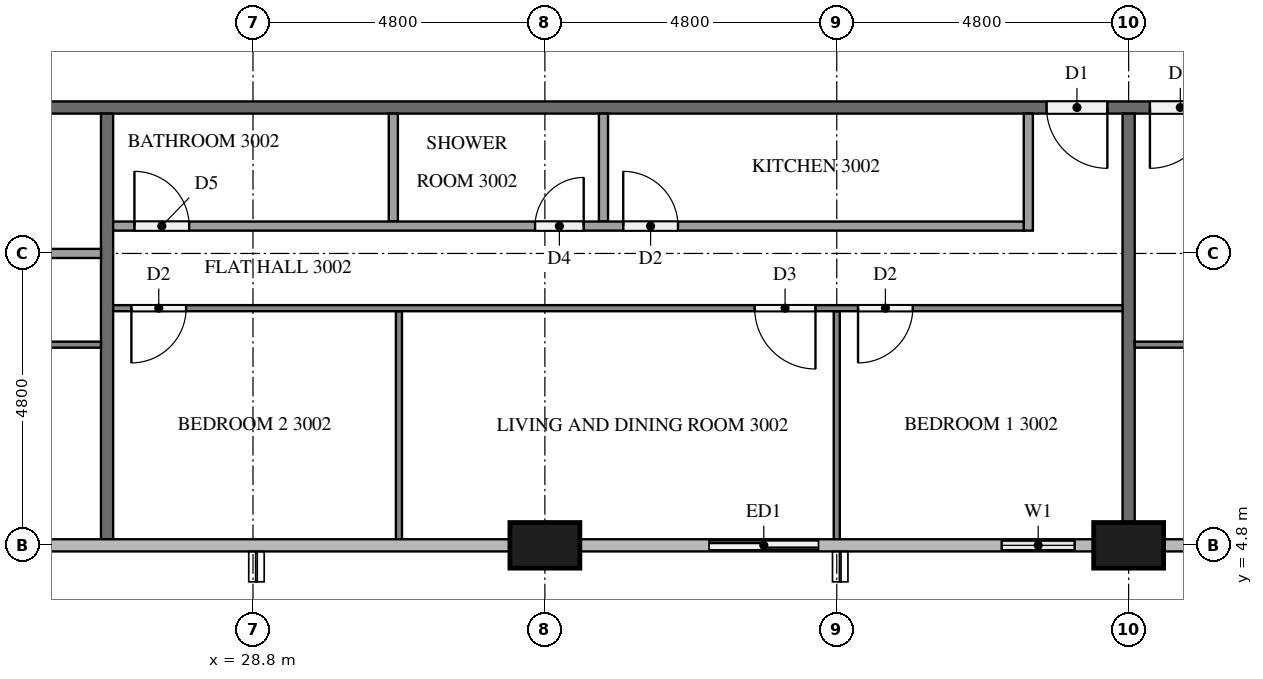
"""IFC4 building model, lengths in metres.
Left out: names, types, materials, properties, quantities, classifications, styles, units other than length and angle.
Written with IfcOpenShell. Run it as: python <this file> out.ifc"""

import sys

from ifc_helpers import new_model, si_unit, direction, frame, frame_2d, origin, origin_2d, place, context, subcontext, project, spatial, rectangle, extrude, element, fill, save


model = new_model("IFC4")
c1 = context("Model", 3, precision=1e-05, world=origin(), true_north=direction((0.0, 1.0)))
c2 = subcontext(c1, "Body", "Model", "MODEL_VIEW")
j1 = project(units=[si_unit("LENGTHUNIT", "METRE"), si_unit("PLANEANGLEUNIT", "RADIAN")], contexts=[c1])
p1 = place(None, origin())
s1 = spatial("IfcSite", under=j1, at=p1, CompositionType="ELEMENT")
p2 = place(p1, origin())
s2 = spatial("IfcBuilding", under=s1, at=p2, CompositionType="ELEMENT")
p3 = place(p2, frame((0.0, 0.0, 119.1)))
s3 = spatial("IfcBuildingStorey", under=s2, at=p3, CompositionType="ELEMENT", Elevation=119.1)
for number, where, z_axis, x_axis in (
    (1, (33.6, 4.8, 0.0), (0.0, 0.0, 1.0), (1.0, 0.0, 0.0)),
    (2, (43.2, 4.8, 0.0), (0.0, 0.0, 1.0), (1.0, 0.0, 0.0)),
):
    element("IfcColumn", number, at=place(p3, frame(where, z_axis=z_axis, x_axis=x_axis)), inside=s3, PredefinedType="COLUMN", context=c2, shape_type="SweptSolid", body=[
        extrude(rectangle(XDim=1.15, YDim=0.75, at=origin_2d()), origin(), (0.0, 0.0, 1.0), 3.2),
    ])
p4 = place(p3, frame((36.0, 4.8, 0.0), z_axis=(0.0, 0.0, 1.0), x_axis=(1.0, 0.0, 0.0)))
e3 = element("IfcWall", 3, at=p4, inside=s3, PredefinedType="SOLIDWALL", context=c2, shape_type="SweptSolid", body=[
    extrude(rectangle(XDim=2.4, YDim=0.15, at=frame_2d((1.2, 0.0))), origin(), (0.0, 0.0, 1.0), 3.2),
])
p5 = place(p4, frame((0.3, 0.0, 0.0)))
e4 = element("IfcOpeningElement", 4, at=p5, cuts=e3, PredefinedType="OPENING", context=c2, shape_type="SweptSolid", body=[
    extrude(rectangle(XDim=1.8, YDim=2.4, at=frame_2d((0.9, 1.2))), frame((0.0, 0.085, 0.0), z_axis=(0.0, -1.0, 0.0), x_axis=(1.0, 0.0, 0.0)), (0.0, 0.0, 1.0), 0.17),
])
p6 = place(p3, frame((40.8, 4.8, 0.0), z_axis=(0.0, 0.0, 1.0), x_axis=(1.0, 0.0, 0.0)))
e5 = element("IfcWall", 5, at=p6, inside=s3, PredefinedType="SOLIDWALL", context=c2, shape_type="SweptSolid", body=[
    extrude(rectangle(XDim=1.825, YDim=0.15, at=frame_2d((0.913, 0.0))), origin(), (0.0, 0.0, 1.0), 3.2),
])
p7 = place(p6, frame((0.312, 0.0, 0.9)))
e6 = element("IfcOpeningElement", 6, at=p7, cuts=e5, PredefinedType="OPENING", context=c2, shape_type="SweptSolid", body=[
    extrude(rectangle(XDim=1.2, YDim=1.4, at=frame_2d((0.6, 0.7))), frame((0.0, 0.085, 0.0), z_axis=(0.0, -1.0, 0.0), x_axis=(1.0, 0.0, 0.0)), (0.0, 0.0, 1.0), 0.17),
])
p8 = place(p3, frame((50.5, 12.0, 0.0), z_axis=(0.0, 0.0, 1.0), x_axis=(-1.0, 0.0, 0.0)))
e7 = element("IfcWall", 7, at=p8, inside=s3, PredefinedType="PARTITIONING", context=c2, shape_type="SweptSolid", body=[
    extrude(rectangle(XDim=38.6, YDim=0.2, at=frame_2d((19.3, 0.0))), origin(), (0.0, 0.0, 1.0), 3.2),
])
p9 = place(p8, frame((37.15, 0.0, 0.0)))
e8 = element("IfcOpeningElement", 8, at=p9, cuts=e7, PredefinedType="OPENING", context=c2, shape_type="SweptSolid", body=[
    extrude(rectangle(XDim=1.0, YDim=2.1, at=frame_2d((0.5, 1.05))), frame((0.0, 0.11, 0.0), z_axis=(0.0, -1.0, 0.0), x_axis=(1.0, 0.0, 0.0)), (0.0, 0.0, 1.0), 0.22),
])
p10 = place(p8, frame((7.65, 0.0, 0.0)))
e9 = element("IfcOpeningElement", 9, at=p10, cuts=e7, PredefinedType="OPENING", context=c2, shape_type="SweptSolid", body=[
    extrude(rectangle(XDim=1.0, YDim=2.1, at=frame_2d((0.5, 1.05))), frame((0.0, 0.11, 0.0), z_axis=(0.0, -1.0, 0.0), x_axis=(1.0, 0.0, 0.0)), (0.0, 0.0, 1.0), 0.22),
])
p11 = place(p8, frame((5.95, 0.0, 0.0)))
e10 = element("IfcOpeningElement", 10, at=p11, cuts=e7, PredefinedType="OPENING", context=c2, shape_type="SweptSolid", body=[
    extrude(rectangle(XDim=1.0, YDim=2.1, at=frame_2d((0.5, 1.05))), frame((0.0, 0.11, 0.0), z_axis=(0.0, -1.0, 0.0), x_axis=(1.0, 0.0, 0.0)), (0.0, 0.0, 1.0), 0.22),
])
p12 = place(p3, frame((26.4, 11.9, 0.0), z_axis=(0.0, 0.0, 1.0), x_axis=(0.0, -1.0, 0.0)))
e11 = element("IfcWall", 11, at=p12, inside=s3, PredefinedType="PARTITIONING", context=c2, shape_type="SweptSolid", body=[
    extrude(rectangle(XDim=7.0, YDim=0.2, at=frame_2d((3.5, 0.0))), origin(), (0.0, 0.0, 1.0), 3.2),
])
p13 = place(p3, frame((43.2, 11.9, 0.0), z_axis=(0.0, 0.0, 1.0), x_axis=(0.0, -1.0, 0.0)))
e12 = element("IfcWall", 12, at=p13, inside=s3, PredefinedType="PARTITIONING", context=c2, shape_type="SweptSolid", body=[
    extrude(rectangle(XDim=6.725, YDim=0.2, at=frame_2d((3.362, 0.0))), origin(), (0.0, 0.0, 1.0), 3.2),
])
p14 = place(p3, frame((26.3, 8.1, 0.0), z_axis=(0.0, 0.0, 1.0), x_axis=(-1.0, 0.0, 0.0)))
e13 = element("IfcWall", 13, at=p14, inside=s3, PredefinedType="PARTITIONING", context=c2, shape_type="SweptSolid", body=[
    extrude(rectangle(XDim=14.2, YDim=0.1, at=frame_2d((7.1, 0.0))), origin(), (0.0, 0.0, 1.0), 3.2),
])
p15 = place(p14, frame((13.0, 0.0, 0.0)))
e14 = element("IfcOpeningElement", 14, at=p15, cuts=e13, PredefinedType="OPENING", context=c2, shape_type="SweptSolid", body=[
    extrude(rectangle(XDim=0.9, YDim=2.1, at=frame_2d((0.45, 1.05))), frame((0.0, 0.06, 0.0), z_axis=(0.0, -1.0, 0.0), x_axis=(1.0, 0.0, 0.0)), (0.0, 0.0, 1.0), 0.12),
])
p16 = place(p14, frame((5.05, 0.0, 0.0)))
e15 = element("IfcOpeningElement", 15, at=p16, cuts=e13, PredefinedType="OPENING", context=c2, shape_type="SweptSolid", body=[
    extrude(rectangle(XDim=0.9, YDim=2.1, at=frame_2d((0.45, 1.05))), frame((0.0, 0.06, 0.0), z_axis=(0.0, -1.0, 0.0), x_axis=(1.0, 0.0, 0.0)), (0.0, 0.0, 1.0), 0.12),
])
p17 = place(p14, frame((3.35, 0.0, 0.0)))
e16 = element("IfcOpeningElement", 16, at=p17, cuts=e13, PredefinedType="OPENING", context=c2, shape_type="SweptSolid", body=[
    extrude(rectangle(XDim=1.0, YDim=2.1, at=frame_2d((0.5, 1.05))), frame((0.0, 0.06, 0.0), z_axis=(0.0, -1.0, 0.0), x_axis=(1.0, 0.0, 0.0)), (0.0, 0.0, 1.0), 0.12),
])
p18 = place(p3, frame((13.725, 9.6, 0.0), z_axis=(0.0, 0.0, 1.0), x_axis=(1.0, 0.0, 0.0)))
e17 = element("IfcWall", 17, at=p18, inside=s3, PredefinedType="PARTITIONING", context=c2, shape_type="SweptSolid", body=[
    extrude(rectangle(XDim=12.575, YDim=0.15, at=frame_2d((6.288, 0.0))), origin(), (0.0, 0.0, 1.0), 3.2),
])
p19 = place(p18, frame((0.3, 0.0, 0.0)))
e18 = element("IfcOpeningElement", 18, at=p19, cuts=e17, PredefinedType="OPENING", context=c2, shape_type="SweptSolid", body=[
    extrude(rectangle(XDim=0.8, YDim=2.1, at=frame_2d((0.4, 1.05))), frame((0.0, 0.085, 0.0), z_axis=(0.0, -1.0, 0.0), x_axis=(1.0, 0.0, 0.0)), (0.0, 0.0, 1.0), 0.17),
])
p20 = place(p18, frame((5.546, 0.0, 0.0)))
e19 = element("IfcOpeningElement", 19, at=p20, cuts=e17, PredefinedType="OPENING", context=c2, shape_type="SweptSolid", body=[
    extrude(rectangle(XDim=0.9, YDim=2.1, at=frame_2d((0.45, 1.05))), frame((0.0, 0.085, 0.0), z_axis=(0.0, -1.0, 0.0), x_axis=(1.0, 0.0, 0.0)), (0.0, 0.0, 1.0), 0.17),
])
p21 = place(p18, frame((7.096, 0.0, 0.0)))
e20 = element("IfcOpeningElement", 20, at=p21, cuts=e17, PredefinedType="OPENING", context=c2, shape_type="SweptSolid", body=[
    extrude(rectangle(XDim=0.9, YDim=2.1, at=frame_2d((0.45, 1.05))), frame((0.0, 0.085, 0.0), z_axis=(0.0, -1.0, 0.0), x_axis=(1.0, 0.0, 0.0)), (0.0, 0.0, 1.0), 0.17),
])
for number, where, z_axis, x_axis in (
    (21, (38.4, 8.65, 0.0), (0.0, 0.0, 1.0), (0.0, -1.0, 0.0)),
    (22, (31.2, 8.65, 0.0), (0.0, 0.0, 1.0), (0.0, -1.0, 0.0)),
):
    element("IfcWall", number, at=place(p3, frame(where, z_axis=z_axis, x_axis=x_axis)), inside=s3, PredefinedType="PARTITIONING", context=c2, shape_type="SweptSolid", body=[
        extrude(rectangle(XDim=3.75, YDim=0.1, at=frame_2d((1.875, 0.0))), origin(), (0.0, 0.0, 1.0), 3.2),
    ])
p22 = place(p3, frame((43.1, 8.7, 0.0), z_axis=(0.0, 0.0, 1.0), x_axis=(-1.0, 0.0, 0.0)))
e23 = element("IfcWall", 23, at=p22, inside=s3, PredefinedType="PARTITIONING", context=c2, shape_type="SweptSolid", body=[
    extrude(rectangle(XDim=16.6, YDim=0.1, at=frame_2d((8.3, 0.0))), origin(), (0.0, 0.0, 1.0), 3.2),
])
p23 = place(p22, frame((3.45, 0.0, 0.0)))
e24 = element("IfcOpeningElement", 24, at=p23, cuts=e23, PredefinedType="OPENING", context=c2, shape_type="SweptSolid", body=[
    extrude(rectangle(XDim=0.9, YDim=2.1, at=frame_2d((0.45, 1.05))), frame((0.0, 0.06, 0.0), z_axis=(0.0, -1.0, 0.0), x_axis=(1.0, 0.0, 0.0)), (0.0, 0.0, 1.0), 0.12),
])
p24 = place(p22, frame((5.05, 0.0, 0.0)))
e25 = element("IfcOpeningElement", 25, at=p24, cuts=e23, PredefinedType="OPENING", context=c2, shape_type="SweptSolid", body=[
    extrude(rectangle(XDim=1.0, YDim=2.1, at=frame_2d((0.5, 1.05))), frame((0.0, 0.06, 0.0), z_axis=(0.0, -1.0, 0.0), x_axis=(1.0, 0.0, 0.0)), (0.0, 0.0, 1.0), 0.12),
])
p25 = place(p22, frame((15.4, 0.0, 0.0)))
e26 = element("IfcOpeningElement", 26, at=p25, cuts=e23, PredefinedType="OPENING", context=c2, shape_type="SweptSolid", body=[
    extrude(rectangle(XDim=0.9, YDim=2.1, at=frame_2d((0.45, 1.05))), frame((0.0, 0.06, 0.0), z_axis=(0.0, -1.0, 0.0), x_axis=(1.0, 0.0, 0.0)), (0.0, 0.0, 1.0), 0.12),
])
for number, where, z_axis, x_axis in (
    (27, (34.563, 11.9, 0.0), (0.0, 0.0, 1.0), (0.0, -1.0, 0.0)),
    (28, (31.108, 11.9, 0.0), (0.0, 0.0, 1.0), (0.0, -1.0, 0.0)),
):
    element("IfcWall", number, at=place(p3, frame(where, z_axis=z_axis, x_axis=x_axis)), inside=s3, PredefinedType="PARTITIONING", context=c2, shape_type="SweptSolid", body=[
        extrude(rectangle(XDim=1.775, YDim=0.15, at=frame_2d((0.887, 0.0))), origin(), (0.0, 0.0, 1.0), 3.2),
    ])
p26 = place(p3, frame((41.55, 11.9, 0.0), z_axis=(0.0, 0.0, 1.0), x_axis=(0.0, -1.0, 0.0)))
e29 = element("IfcWall", 29, at=p26, inside=s3, PredefinedType="PARTITIONING", context=c2, shape_type="SweptSolid", body=[
    extrude(rectangle(XDim=1.925, YDim=0.15, at=frame_2d((0.962, 0.0))), origin(), (0.0, 0.0, 1.0), 3.2),
])
p27 = place(p3, frame((26.5, 10.05, 0.0), z_axis=(0.0, 0.0, 1.0), x_axis=(1.0, 0.0, 0.0)))
e30 = element("IfcWall", 30, at=p27, inside=s3, PredefinedType="PARTITIONING", context=c2, shape_type="SweptSolid", body=[
    extrude(rectangle(XDim=14.975, YDim=0.15, at=frame_2d((7.488, 0.0))), origin(), (0.0, 0.0, 1.0), 3.2),
])
p28 = place(p27, frame((8.388, 0.0, 0.0)))
e31 = element("IfcOpeningElement", 31, at=p28, cuts=e30, PredefinedType="OPENING", context=c2, shape_type="SweptSolid", body=[
    extrude(rectangle(XDim=0.9, YDim=2.1, at=frame_2d((0.45, 1.05))), frame((0.0, 0.085, 0.0), z_axis=(0.0, -1.0, 0.0), x_axis=(1.0, 0.0, 0.0)), (0.0, 0.0, 1.0), 0.17),
])
p29 = place(p27, frame((6.938, 0.0, 0.0)))
e32 = element("IfcOpeningElement", 32, at=p29, cuts=e30, PredefinedType="OPENING", context=c2, shape_type="SweptSolid", body=[
    extrude(rectangle(XDim=0.8, YDim=2.1, at=frame_2d((0.4, 1.05))), frame((0.0, 0.085, 0.0), z_axis=(0.0, -1.0, 0.0), x_axis=(1.0, 0.0, 0.0)), (0.0, 0.0, 1.0), 0.17),
])
p30 = place(p27, frame((0.35, 0.0, 0.0)))
e33 = element("IfcOpeningElement", 33, at=p30, cuts=e30, PredefinedType="OPENING", context=c2, shape_type="SweptSolid", body=[
    extrude(rectangle(XDim=0.9, YDim=2.1, at=frame_2d((0.45, 1.05))), frame((0.0, 0.085, 0.0), z_axis=(0.0, -1.0, 0.0), x_axis=(1.0, 0.0, 0.0)), (0.0, 0.0, 1.0), 0.17),
])
p31 = place(p3, frame((50.3, 8.1, 0.0), z_axis=(0.0, 0.0, 1.0), x_axis=(-1.0, 0.0, 0.0)))
e34 = element("IfcWall", 34, at=p31, inside=s3, PredefinedType="PARTITIONING", context=c2, shape_type="SweptSolid", body=[
    extrude(rectangle(XDim=7.0, YDim=0.1, at=frame_2d((3.5, 0.0))), origin(), (0.0, 0.0, 1.0), 3.2),
])
p32 = place(p31, frame((0.3, 0.0, 0.0)))
e35 = element("IfcOpeningElement", 35, at=p32, cuts=e34, PredefinedType="OPENING", context=c2, shape_type="SweptSolid", body=[
    extrude(rectangle(XDim=1.0, YDim=2.1, at=frame_2d((0.5, 1.05))), frame((0.0, 0.06, 0.0), z_axis=(0.0, -1.0, 0.0), x_axis=(1.0, 0.0, 0.0)), (0.0, 0.0, 1.0), 0.12),
])
p33 = place(p5, origin())
e36 = element("IfcDoor", 36, at=p33, inside=s3, OperationType="SLIDING_TO_LEFT", PredefinedType="DOOR", context=c2, shape_type="SweptSolid", body=[
    extrude(rectangle(XDim=1.8, YDim=2.4, at=frame_2d((0.9, 1.2))), frame((0.0, 0.025, 0.0), z_axis=(0.0, -1.0, 0.0), x_axis=(1.0, 0.0, 0.0)), (0.0, 0.0, 1.0), 0.05),
])
fill(e4, e36)
p34 = place(p7, origin())
e37 = element("IfcWindow", 37, at=p34, inside=s3, PartitioningType="SINGLE_PANEL", PredefinedType="WINDOW", context=c2, shape_type="SweptSolid", body=[
    extrude(rectangle(XDim=1.2, YDim=1.4, at=frame_2d((0.6, 0.7))), frame((0.0, 0.03, 0.0), z_axis=(0.0, -1.0, 0.0), x_axis=(1.0, 0.0, 0.0)), (0.0, 0.0, 1.0), 0.06),
])
fill(e6, e37)
p35 = place(p10, origin())
e38 = element("IfcDoor", 38, at=p35, inside=s3, OperationType="SINGLE_SWING_LEFT", PredefinedType="DOOR", context=c2, shape_type="SweptSolid", body=[
    extrude(rectangle(XDim=1.0, YDim=2.1, at=frame_2d((0.5, 1.05))), frame((0.0, 0.025, 0.0), z_axis=(0.0, -1.0, 0.0), x_axis=(1.0, 0.0, 0.0)), (0.0, 0.0, 1.0), 0.05),
])
fill(e9, e38)
p36 = place(p11, origin())
e39 = element("IfcDoor", 39, at=p36, inside=s3, OperationType="SINGLE_SWING_RIGHT", PredefinedType="DOOR", context=c2, shape_type="SweptSolid", body=[
    extrude(rectangle(XDim=1.0, YDim=2.1, at=frame_2d((0.5, 1.05))), frame((0.0, 0.025, 0.0), z_axis=(0.0, -1.0, 0.0), x_axis=(1.0, 0.0, 0.0)), (0.0, 0.0, 1.0), 0.05),
])
fill(e10, e39)
p37 = place(p23, origin())
e40 = element("IfcDoor", 40, at=p37, inside=s3, OperationType="SINGLE_SWING_RIGHT", PredefinedType="DOOR", context=c2, shape_type="SweptSolid", body=[
    extrude(rectangle(XDim=0.9, YDim=2.1, at=frame_2d((0.45, 1.05))), frame((0.0, 0.025, 0.0), z_axis=(0.0, -1.0, 0.0), x_axis=(1.0, 0.0, 0.0)), (0.0, 0.0, 1.0), 0.05),
])
fill(e24, e40)
p38 = place(p24, origin())
e41 = element("IfcDoor", 41, at=p38, inside=s3, OperationType="SINGLE_SWING_LEFT", PredefinedType="DOOR", context=c2, shape_type="SweptSolid", body=[
    extrude(rectangle(XDim=1.0, YDim=2.1, at=frame_2d((0.5, 1.05))), frame((0.0, 0.025, 0.0), z_axis=(0.0, -1.0, 0.0), x_axis=(1.0, 0.0, 0.0)), (0.0, 0.0, 1.0), 0.05),
])
fill(e25, e41)
p39 = place(p25, origin())
e42 = element("IfcDoor", 42, at=p39, inside=s3, OperationType="SINGLE_SWING_RIGHT", PredefinedType="DOOR", context=c2, shape_type="SweptSolid", body=[
    extrude(rectangle(XDim=0.9, YDim=2.1, at=frame_2d((0.45, 1.05))), frame((0.0, 0.025, 0.0), z_axis=(0.0, -1.0, 0.0), x_axis=(1.0, 0.0, 0.0)), (0.0, 0.0, 1.0), 0.05),
])
fill(e26, e42)
p40 = place(p28, origin())
e43 = element("IfcDoor", 43, at=p40, inside=s3, OperationType="SINGLE_SWING_LEFT", PredefinedType="DOOR", context=c2, shape_type="SweptSolid", body=[
    extrude(rectangle(XDim=0.9, YDim=2.1, at=frame_2d((0.45, 1.05))), frame((0.0, 0.025, 0.0), z_axis=(0.0, -1.0, 0.0), x_axis=(1.0, 0.0, 0.0)), (0.0, 0.0, 1.0), 0.05),
])
fill(e31, e43)
p41 = place(p29, origin())
e44 = element("IfcDoor", 44, at=p41, inside=s3, OperationType="SINGLE_SWING_RIGHT", PredefinedType="DOOR", context=c2, shape_type="SweptSolid", body=[
    extrude(rectangle(XDim=0.8, YDim=2.1, at=frame_2d((0.4, 1.05))), frame((0.0, 0.025, 0.0), z_axis=(0.0, -1.0, 0.0), x_axis=(1.0, 0.0, 0.0)), (0.0, 0.0, 1.0), 0.05),
])
fill(e32, e44)
p42 = place(p30, origin())
e45 = element("IfcDoor", 45, at=p42, inside=s3, OperationType="SINGLE_SWING_LEFT", PredefinedType="DOOR", context=c2, shape_type="SweptSolid", body=[
    extrude(rectangle(XDim=0.9, YDim=2.1, at=frame_2d((0.45, 1.05))), frame((0.0, 0.025, 0.0), z_axis=(0.0, -1.0, 0.0), x_axis=(1.0, 0.0, 0.0)), (0.0, 0.0, 1.0), 0.05),
])
fill(e33, e45)
save(model, sys.argv[1])
